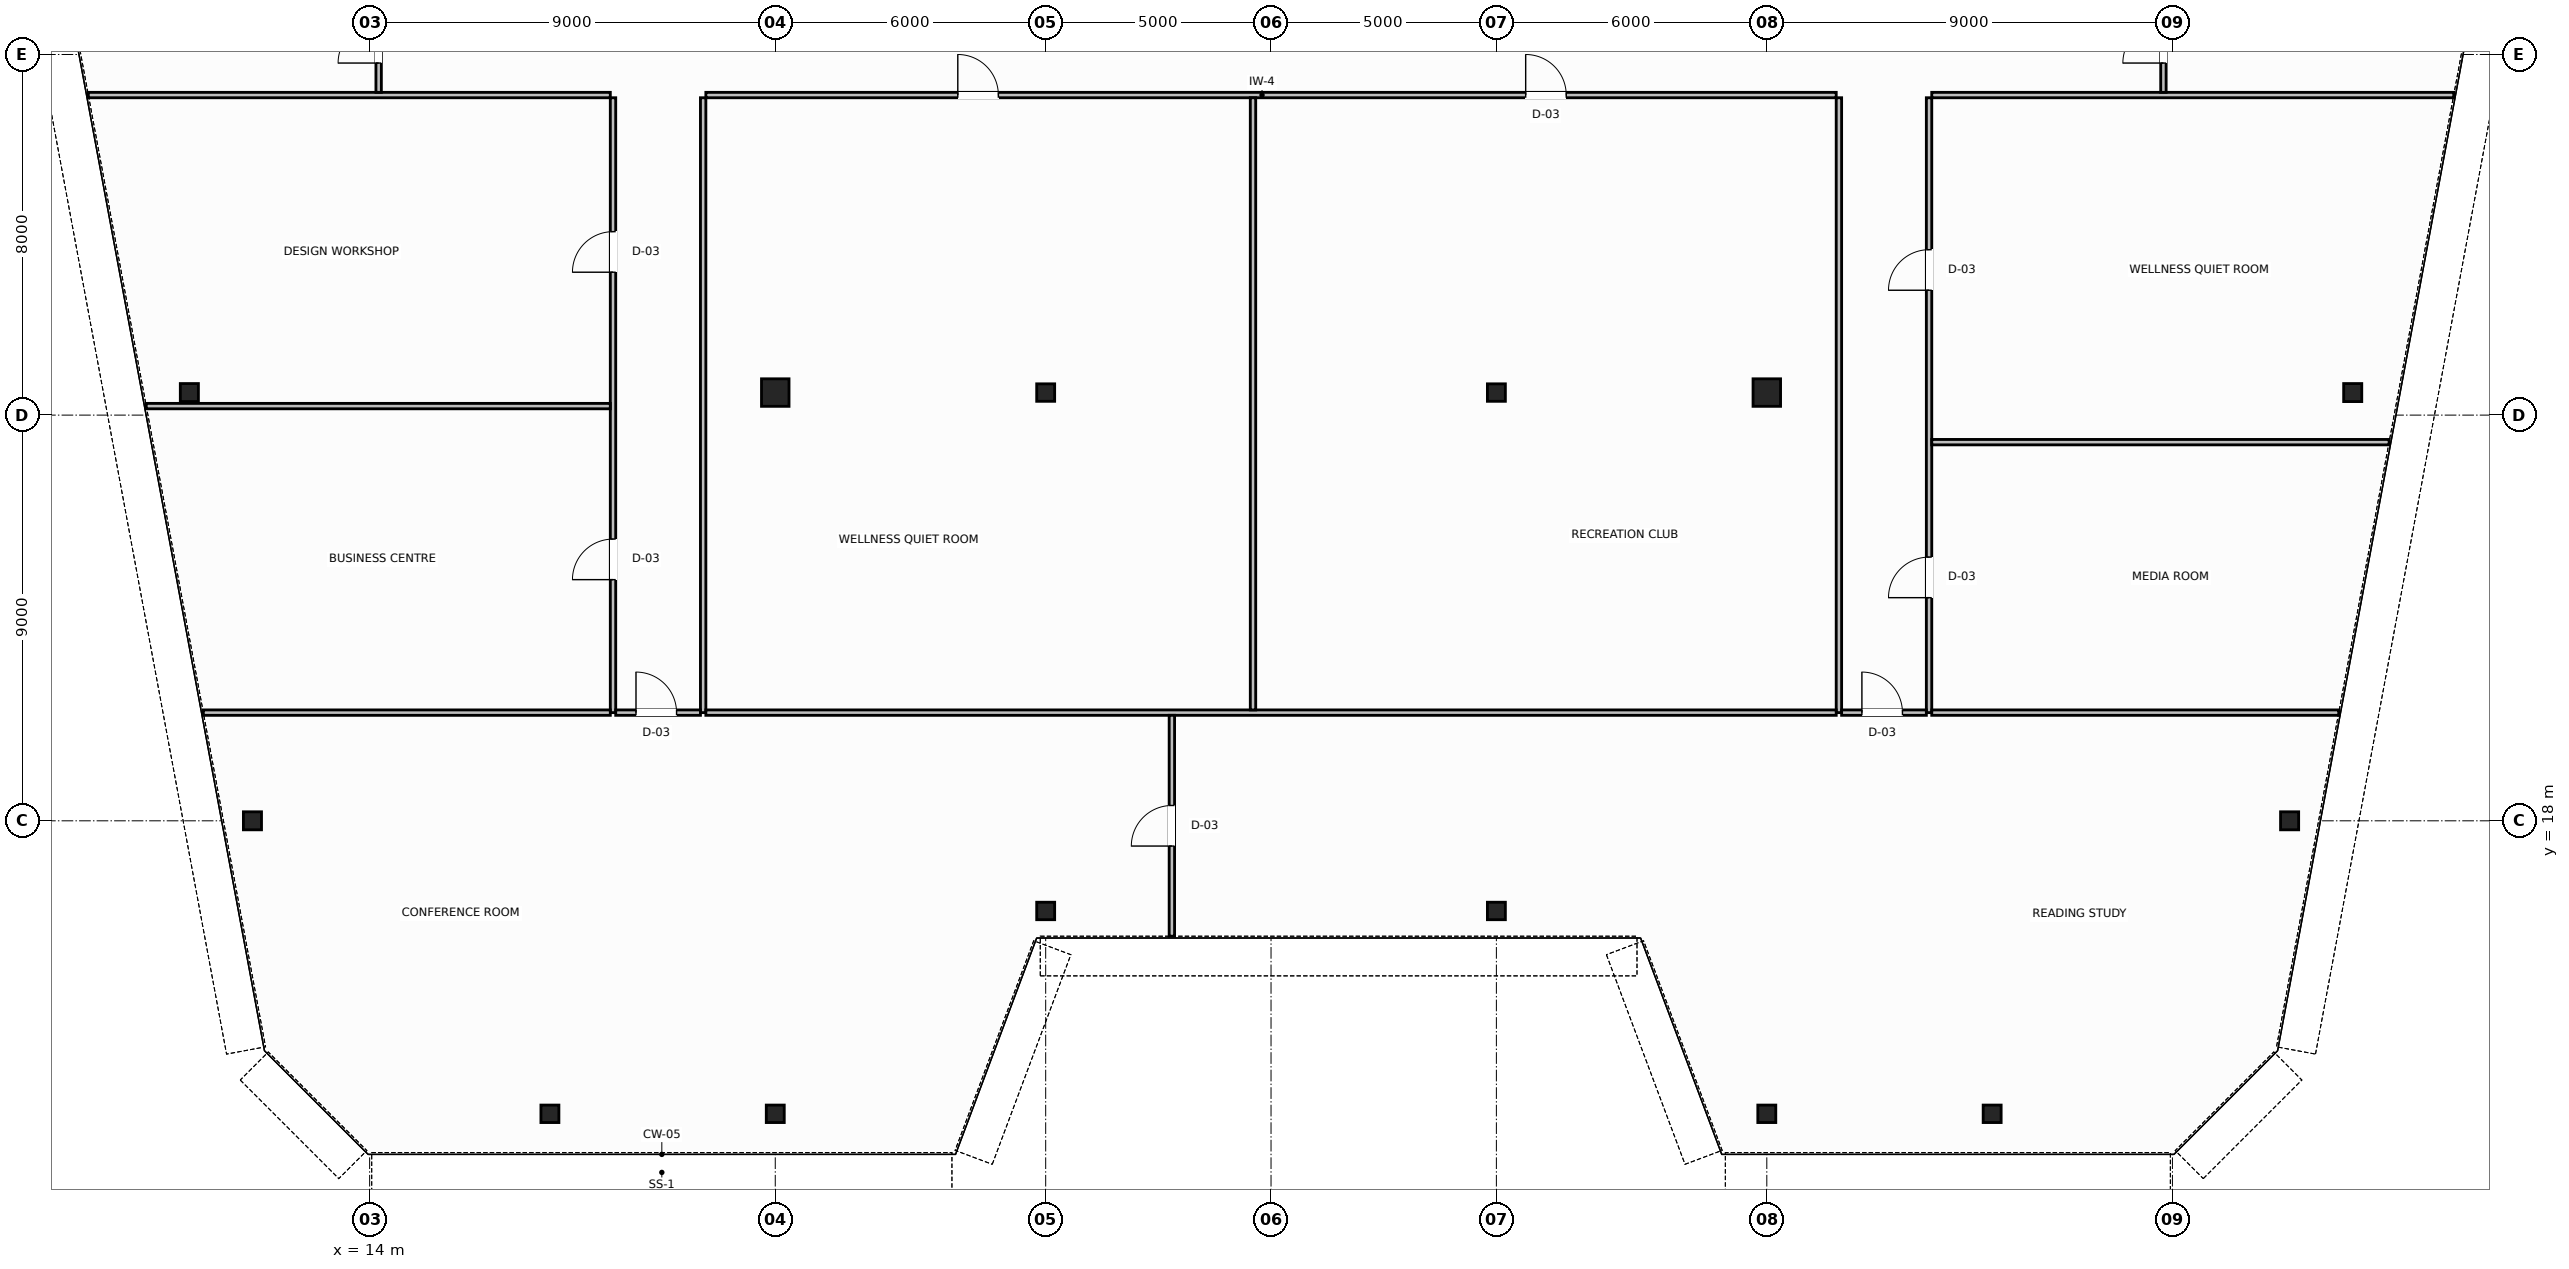
"""IFC4 building model, lengths in metres.
Left out: names, types, materials, properties, quantities, classifications, styles, units other than length and angle.
Written with IfcOpenShell. Run it as: python <this file> out.ifc"""

import sys

from ifc_helpers import new_model, si_unit, direction, frame, frame_2d, origin, origin_2d, place, context, subcontext, project, spatial, rectangle, hollow_circle, i_section, extrude, source, transform, mapped, element, fill, save


model = new_model("IFC4")
c1 = context("Model", 3, precision=1e-05, world=origin(), true_north=direction((0.0, 1.0)))
c2 = subcontext(c1, "Body", "Model", "MODEL_VIEW")
j1 = project(units=[si_unit("LENGTHUNIT", "METRE"), si_unit("PLANEANGLEUNIT", "RADIAN")], contexts=[c1])
p1 = place(None, origin())
s1 = spatial("IfcSite", under=j1, at=p1, CompositionType="ELEMENT")
p2 = place(p1, origin())
s2 = spatial("IfcBuilding", under=s1, at=p2, CompositionType="ELEMENT")
p3 = place(p2, frame((0.0, 0.0, 249.8)))
s3 = spatial("IfcBuildingStorey", under=s2, at=p3, CompositionType="ELEMENT", Elevation=249.8)
m1 = source(origin(), c2, "Body", "SweptSolid", [
    extrude(i_section(OverallWidth=0.401, OverallDepth=0.399, WebThickness=0.025, FlangeThickness=0.035, FilletRadius=0.015, at=origin_2d()), origin(), (0.0, 0.0, 1.0), 3.8),
])
for number, where, z_axis, x_axis in (
    (1, (10.0, 27.5, 0.0), (0.0, 0.0, 1.0), (1.0, 0.0, 0.0)),
    (2, (11.4, 18.0, 0.0), (0.0, 0.0, 1.0), (1.0, 0.0, 0.0)),
    (3, (58.0, 27.5, 0.0), (0.0, 0.0, 1.0), (1.0, 0.0, 0.0)),
    (4, (56.6, 18.0, 0.0), (0.0, 0.0, 1.0), (1.0, 0.0, 0.0)),
):
    element("IfcColumn", number, at=place(p3, frame(where, z_axis=z_axis, x_axis=x_axis)), inside=s3, PredefinedType="COLUMN", context=c2, shape_type="MappedRepresentation", body=[
        mapped(m1, transform((0.0, 0.0, 0.0), scale=1.0)),
    ])
m2 = source(origin(), c2, "Body", "SweptSolid", [
    extrude(hollow_circle(Radius=0.305, WallThickness=0.03, at=origin_2d()), origin(), (0.0, 0.0, 1.0), 3.8),
])
p4 = place(p3, frame((23.0, 27.5, 0.0), z_axis=(0.0, 0.0, 1.0), x_axis=(1.0, 0.0, 0.0)))
e5 = element("IfcColumn", 5, at=p4, inside=s3, PredefinedType="COLUMN", context=c2, shape_type="MappedRepresentation", body=[
    mapped(m2, transform((0.0, 0.0, 0.0), scale=1.0)),
])
m3 = source(origin(), c2, "Body", "SweptSolid", [
    extrude(i_section(OverallWidth=0.398, OverallDepth=0.387, WebThickness=0.021, FlangeThickness=0.029, FilletRadius=0.015, at=origin_2d()), origin(), (0.0, 0.0, 1.0), 3.8),
])
for number, where, z_axis, x_axis in (
    (6, (29.0, 27.5, 0.0), (0.0, 0.0, 1.0), (1.0, 0.0, 0.0)),
    (7, (39.0, 27.5, 0.0), (0.0, 0.0, 1.0), (1.0, 0.0, 0.0)),
):
    element("IfcColumn", number, at=place(p3, frame(where, z_axis=z_axis, x_axis=x_axis)), inside=s3, PredefinedType="COLUMN", context=c2, shape_type="MappedRepresentation", body=[
        mapped(m3, transform((0.0, 0.0, 0.0), scale=1.0)),
    ])
p5 = place(p3, frame((45.0, 27.5, 0.0), z_axis=(0.0, 0.0, 1.0), x_axis=(1.0, 0.0, 0.0)))
e8 = element("IfcColumn", 8, at=p5, inside=s3, PredefinedType="COLUMN", context=c2, shape_type="MappedRepresentation", body=[
    mapped(m2, transform((0.0, 0.0, 0.0), scale=1.0)),
])
for number, where, z_axis, x_axis in (
    (9, (18.0, 11.5, 0.0), (0.0, 0.0, 1.0), (1.0, 0.0, 0.0)),
    (10, (23.0, 11.5, 0.0), (0.0, 0.0, 1.0), (1.0, 0.0, 0.0)),
    (11, (29.0, 16.0, 0.0), (0.0, 0.0, 1.0), (1.0, 0.0, 0.0)),
    (12, (39.0, 16.0, 0.0), (0.0, 0.0, 1.0), (1.0, 0.0, 0.0)),
    (13, (45.0, 11.5, 0.0), (0.0, 0.0, 1.0), (1.0, 0.0, 0.0)),
    (14, (50.0, 11.5, 0.0), (0.0, 0.0, 1.0), (1.0, 0.0, 0.0)),
):
    element("IfcColumn", number, at=place(p3, frame(where, z_axis=z_axis, x_axis=x_axis)), inside=s3, PredefinedType="COLUMN", context=c2, shape_type="MappedRepresentation", body=[
        mapped(m3, transform((0.0, 0.0, 0.0), scale=1.0)),
    ])
p6 = place(p3, frame((21.46, 34.1, 0.0), z_axis=(0.0, 0.0, 1.0), x_axis=(1.0, 0.0, 0.0)))
e15 = element("IfcWall", 15, at=p6, inside=s3, PredefinedType="PARTITIONING", context=c2, shape_type="SweptSolid", body=[
    extrude(rectangle(XDim=25.08, YDim=0.12, at=frame_2d((12.54, 0.0))), origin(), (0.0, 0.0, 1.0), 3.58),
])
p7 = place(p6, frame((5.59, 0.0, 0.0)))
e16 = element("IfcOpeningElement", 16, at=p7, cuts=e15, PredefinedType="OPENING", context=c2, shape_type="SweptSolid", body=[
    extrude(rectangle(XDim=0.9, YDim=2.15, at=frame_2d((0.45, 1.075))), frame((0.0, 0.07, 0.0), z_axis=(0.0, -1.0, 0.0), x_axis=(1.0, 0.0, 0.0)), (0.0, 0.0, 1.0), 0.14),
])
p8 = place(p6, frame((18.19, 0.0, 0.0)))
e17 = element("IfcOpeningElement", 17, at=p8, cuts=e15, PredefinedType="OPENING", context=c2, shape_type="SweptSolid", body=[
    extrude(rectangle(XDim=0.9, YDim=2.15, at=frame_2d((0.45, 1.075))), frame((0.0, 0.07, 0.0), z_axis=(0.0, -1.0, 0.0), x_axis=(1.0, 0.0, 0.0)), (0.0, 0.0, 1.0), 0.14),
])
for number, where, z_axis, x_axis in (
    (18, (7.759, 34.1, 0.0), (0.0, 0.0, 1.0), (1.0, 0.0, 0.0)),
    (19, (48.66, 34.1, 0.0), (0.0, 0.0, 1.0), (1.0, 0.0, 0.0)),
):
    element("IfcWall", number, at=place(p3, frame(where, z_axis=z_axis, x_axis=x_axis)), inside=s3, PredefinedType="PARTITIONING", context=c2, shape_type="SweptSolid", body=[
        extrude(rectangle(XDim=11.582, YDim=0.12, at=frame_2d((5.791, 0.0))), origin(), (0.0, 0.0, 1.0), 3.58),
    ])
p9 = place(p3, frame((14.2, 34.16, 0.0), z_axis=(0.0, 0.0, 1.0), x_axis=(0.0, 1.0, 0.0)))
e20 = element("IfcWall", 20, at=p9, inside=s3, PredefinedType="PARTITIONING", context=c2, shape_type="SweptSolid", body=[
    extrude(rectangle(XDim=2.28, YDim=0.12, at=frame_2d((1.14, 0.0))), origin(), (0.0, 0.0, 1.0), 3.58),
])
p10 = place(p9, frame((0.65, 0.0, 0.0)))
e21 = element("IfcOpeningElement", 21, at=p10, cuts=e20, PredefinedType="OPENING", context=c2, shape_type="SweptSolid", body=[
    extrude(rectangle(XDim=0.9, YDim=2.15, at=frame_2d((0.45, 1.075))), frame((0.0, 0.07, 0.0), z_axis=(0.0, -1.0, 0.0), x_axis=(1.0, 0.0, 0.0)), (0.0, 0.0, 1.0), 0.14),
])
p11 = place(p3, frame((53.8, 34.16, 0.0), z_axis=(0.0, 0.0, 1.0), x_axis=(0.0, 1.0, 0.0)))
e22 = element("IfcWall", 22, at=p11, inside=s3, PredefinedType="PARTITIONING", context=c2, shape_type="SweptSolid", body=[
    extrude(rectangle(XDim=2.28, YDim=0.12, at=frame_2d((1.14, 0.0))), origin(), (0.0, 0.0, 1.0), 3.58),
])
p12 = place(p11, frame((0.65, 0.0, 0.0)))
e23 = element("IfcOpeningElement", 23, at=p12, cuts=e22, PredefinedType="OPENING", context=c2, shape_type="SweptSolid", body=[
    extrude(rectangle(XDim=0.9, YDim=2.15, at=frame_2d((0.45, 1.075))), frame((0.0, 0.07, 0.0), z_axis=(0.0, -1.0, 0.0), x_axis=(1.0, 0.0, 0.0)), (0.0, 0.0, 1.0), 0.14),
])
p13 = place(p3, frame((19.4, 20.4, 0.0), z_axis=(0.0, 0.0, 1.0), x_axis=(0.0, 1.0, 0.0)))
e24 = element("IfcWall", 24, at=p13, inside=s3, PredefinedType="PARTITIONING", context=c2, shape_type="SweptSolid", body=[
    extrude(rectangle(XDim=13.64, YDim=0.12, at=frame_2d((6.82, 0.0))), origin(), (0.0, 0.0, 1.0), 3.58),
])
p14 = place(p13, frame((2.95, 0.0, 0.0)))
e25 = element("IfcOpeningElement", 25, at=p14, cuts=e24, PredefinedType="OPENING", context=c2, shape_type="SweptSolid", body=[
    extrude(rectangle(XDim=0.9, YDim=2.15, at=frame_2d((0.45, 1.075))), frame((0.0, 0.07, 0.0), z_axis=(0.0, -1.0, 0.0), x_axis=(1.0, 0.0, 0.0)), (0.0, 0.0, 1.0), 0.14),
])
p15 = place(p13, frame((9.77, 0.0, 0.0)))
e26 = element("IfcOpeningElement", 26, at=p15, cuts=e24, PredefinedType="OPENING", context=c2, shape_type="SweptSolid", body=[
    extrude(rectangle(XDim=0.9, YDim=2.15, at=frame_2d((0.45, 1.075))), frame((0.0, 0.07, 0.0), z_axis=(0.0, -1.0, 0.0), x_axis=(1.0, 0.0, 0.0)), (0.0, 0.0, 1.0), 0.14),
])
for number, where, z_axis, x_axis in (
    (27, (21.4, 20.4, 0.0), (0.0, 0.0, 1.0), (0.0, 1.0, 0.0)),
    (28, (46.6, 20.4, 0.0), (0.0, 0.0, 1.0), (0.0, 1.0, 0.0)),
):
    element("IfcWall", number, at=place(p3, frame(where, z_axis=z_axis, x_axis=x_axis)), inside=s3, PredefinedType="PARTITIONING", context=c2, shape_type="SweptSolid", body=[
        extrude(rectangle(XDim=13.64, YDim=0.12, at=frame_2d((6.82, 0.0))), origin(), (0.0, 0.0, 1.0), 3.58),
    ])
p16 = place(p3, frame((48.6, 20.4, 0.0), z_axis=(0.0, 0.0, 1.0), x_axis=(0.0, 1.0, 0.0)))
e29 = element("IfcWall", 29, at=p16, inside=s3, PredefinedType="PARTITIONING", context=c2, shape_type="SweptSolid", body=[
    extrude(rectangle(XDim=13.64, YDim=0.12, at=frame_2d((6.82, 0.0))), origin(), (0.0, 0.0, 1.0), 3.58),
])
p17 = place(p16, frame((2.55, 0.0, 0.0)))
e30 = element("IfcOpeningElement", 30, at=p17, cuts=e29, PredefinedType="OPENING", context=c2, shape_type="SweptSolid", body=[
    extrude(rectangle(XDim=0.9, YDim=2.15, at=frame_2d((0.45, 1.075))), frame((0.0, 0.07, 0.0), z_axis=(0.0, -1.0, 0.0), x_axis=(1.0, 0.0, 0.0)), (0.0, 0.0, 1.0), 0.14),
])
p18 = place(p16, frame((9.37, 0.0, 0.0)))
e31 = element("IfcOpeningElement", 31, at=p18, cuts=e29, PredefinedType="OPENING", context=c2, shape_type="SweptSolid", body=[
    extrude(rectangle(XDim=0.9, YDim=2.15, at=frame_2d((0.45, 1.075))), frame((0.0, 0.07, 0.0), z_axis=(0.0, -1.0, 0.0), x_axis=(1.0, 0.0, 0.0)), (0.0, 0.0, 1.0), 0.14),
])
p19 = place(p3, frame((19.46, 20.4, 0.0), z_axis=(0.0, 0.0, 1.0), x_axis=(1.0, 0.0, 0.0)))
e32 = element("IfcWall", 32, at=p19, inside=s3, PredefinedType="PARTITIONING", context=c2, shape_type="SweptSolid", body=[
    extrude(rectangle(XDim=1.88, YDim=0.12, at=frame_2d((0.94, 0.0))), origin(), (0.0, 0.0, 1.0), 3.58),
])
p20 = place(p19, frame((0.45, 0.0, 0.0)))
e33 = element("IfcOpeningElement", 33, at=p20, cuts=e32, PredefinedType="OPENING", context=c2, shape_type="SweptSolid", body=[
    extrude(rectangle(XDim=0.9, YDim=2.15, at=frame_2d((0.45, 1.075))), frame((0.0, 0.07, 0.0), z_axis=(0.0, -1.0, 0.0), x_axis=(1.0, 0.0, 0.0)), (0.0, 0.0, 1.0), 0.14),
])
p21 = place(p3, frame((46.66, 20.4, 0.0), z_axis=(0.0, 0.0, 1.0), x_axis=(1.0, 0.0, 0.0)))
e34 = element("IfcWall", 34, at=p21, inside=s3, PredefinedType="PARTITIONING", context=c2, shape_type="SweptSolid", body=[
    extrude(rectangle(XDim=1.88, YDim=0.12, at=frame_2d((0.94, 0.0))), origin(), (0.0, 0.0, 1.0), 3.58),
])
p22 = place(p21, frame((0.45, 0.0, 0.0)))
e35 = element("IfcOpeningElement", 35, at=p22, cuts=e34, PredefinedType="OPENING", context=c2, shape_type="SweptSolid", body=[
    extrude(rectangle(XDim=0.9, YDim=2.15, at=frame_2d((0.45, 1.075))), frame((0.0, 0.07, 0.0), z_axis=(0.0, -1.0, 0.0), x_axis=(1.0, 0.0, 0.0)), (0.0, 0.0, 1.0), 0.14),
])
p23 = place(p3, frame((10.31, 20.4, 0.0), z_axis=(0.0, 0.0, 1.0), x_axis=(1.0, 0.0, 0.0)))
e36 = element("IfcWall", 36, at=p23, inside=s3, PredefinedType="PARTITIONING", context=c2, shape_type="SweptSolid", body=[
    extrude(rectangle(XDim=9.031, YDim=0.12, at=frame_2d((4.515, 0.0))), origin(), (0.0, 0.0, 1.0), 3.58),
])
p24 = place(p3, frame((9.043, 27.2, 0.0), z_axis=(0.0, 0.0, 1.0), x_axis=(1.0, 0.0, 0.0)))
e37 = element("IfcWall", 37, at=p24, inside=s3, PredefinedType="PARTITIONING", context=c2, shape_type="SweptSolid", body=[
    extrude(rectangle(XDim=10.297, YDim=0.12, at=frame_2d((5.148, 0.0))), origin(), (0.0, 0.0, 1.0), 3.58),
])
p25 = place(p3, frame((48.66, 20.4, 0.0), z_axis=(0.0, 0.0, 1.0), x_axis=(1.0, 0.0, 0.0)))
e38 = element("IfcWall", 38, at=p25, inside=s3, PredefinedType="PARTITIONING", context=c2, shape_type="SweptSolid", body=[
    extrude(rectangle(XDim=9.031, YDim=0.12, at=frame_2d((4.515, 0.0))), origin(), (0.0, 0.0, 1.0), 3.58),
])
p26 = place(p3, frame((48.66, 26.4, 0.0), z_axis=(0.0, 0.0, 1.0), x_axis=(1.0, 0.0, 0.0)))
e39 = element("IfcWall", 39, at=p26, inside=s3, PredefinedType="PARTITIONING", context=c2, shape_type="SweptSolid", body=[
    extrude(rectangle(XDim=10.148, YDim=0.12, at=frame_2d((5.074, 0.0))), origin(), (0.0, 0.0, 1.0), 3.58),
])
p27 = place(p3, frame((21.46, 20.4, 0.0), z_axis=(0.0, 0.0, 1.0), x_axis=(1.0, 0.0, 0.0)))
e40 = element("IfcWall", 40, at=p27, inside=s3, PredefinedType="PARTITIONING", context=c2, shape_type="SweptSolid", body=[
    extrude(rectangle(XDim=25.08, YDim=0.12, at=frame_2d((12.54, 0.0))), origin(), (0.0, 0.0, 1.0), 3.58),
])
p28 = place(p3, frame((33.6, 20.46, 0.0), z_axis=(0.0, 0.0, 1.0), x_axis=(0.0, 1.0, 0.0)))
e41 = element("IfcWall", 41, at=p28, inside=s3, PredefinedType="PARTITIONING", context=c2, shape_type="SweptSolid", body=[
    extrude(rectangle(XDim=13.58, YDim=0.12, at=frame_2d((6.79, 0.0))), origin(), (0.0, 0.0, 1.0), 3.58),
])
p29 = place(p3, frame((31.8, 15.44, 0.0), z_axis=(0.0, 0.0, 1.0), x_axis=(0.0, 1.0, 0.0)))
e42 = element("IfcWall", 42, at=p29, inside=s3, PredefinedType="PARTITIONING", context=c2, shape_type="SweptSolid", body=[
    extrude(rectangle(XDim=4.9, YDim=0.12, at=frame_2d((2.45, 0.0))), origin(), (0.0, 0.0, 1.0), 3.58),
])
p30 = place(p29, frame((2.0, 0.0, 0.0)))
e43 = element("IfcOpeningElement", 43, at=p30, cuts=e42, PredefinedType="OPENING", context=c2, shape_type="SweptSolid", body=[
    extrude(rectangle(XDim=0.9, YDim=2.15, at=frame_2d((0.45, 1.075))), frame((0.0, 0.07, 0.0), z_axis=(0.0, -1.0, 0.0), x_axis=(1.0, 0.0, 0.0)), (0.0, 0.0, 1.0), 0.14),
])
m4 = source(origin(), c2, "Body", "SweptSolid", [
    extrude(rectangle(XDim=0.9, YDim=2.15, at=frame_2d((0.45, 1.075))), frame((0.0, 0.025, 0.0), z_axis=(0.0, -1.0, 0.0), x_axis=(1.0, 0.0, 0.0)), (0.0, 0.0, 1.0), 0.05),
])
p31 = place(p10, origin())
e44 = element("IfcDoor", 44, at=p31, inside=s3, OperationType="SINGLE_SWING_LEFT", PredefinedType="DOOR", context=c2, shape_type="MappedRepresentation", body=[
    mapped(m4, transform((0.0, 0.0, 0.0), scale=1.0)),
])
fill(e21, e44)
p32 = place(p12, origin())
e45 = element("IfcDoor", 45, at=p32, inside=s3, OperationType="SINGLE_SWING_RIGHT", PredefinedType="DOOR", context=c2, shape_type="MappedRepresentation", body=[
    mapped(m4, transform((0.0, 0.0, 0.0), scale=1.0)),
])
fill(e23, e45)
p33 = place(p14, origin())
e46 = element("IfcDoor", 46, at=p33, inside=s3, OperationType="SINGLE_SWING_LEFT", PredefinedType="DOOR", context=c2, shape_type="MappedRepresentation", body=[
    mapped(m4, transform((0.0, 0.0, 0.0), scale=1.0)),
])
fill(e25, e46)
p34 = place(p15, origin())
e47 = element("IfcDoor", 47, at=p34, inside=s3, OperationType="SINGLE_SWING_RIGHT", PredefinedType="DOOR", context=c2, shape_type="MappedRepresentation", body=[
    mapped(m4, transform((0.0, 0.0, 0.0), scale=1.0)),
])
fill(e26, e47)
p35 = place(p17, origin())
e48 = element("IfcDoor", 48, at=p35, inside=s3, OperationType="SINGLE_SWING_RIGHT", PredefinedType="DOOR", context=c2, shape_type="MappedRepresentation", body=[
    mapped(m4, transform((0.0, 0.0, 0.0), scale=1.0)),
])
fill(e30, e48)
p36 = place(p18, origin())
e49 = element("IfcDoor", 49, at=p36, inside=s3, OperationType="SINGLE_SWING_LEFT", PredefinedType="DOOR", context=c2, shape_type="MappedRepresentation", body=[
    mapped(m4, transform((0.0, 0.0, 0.0), scale=1.0)),
])
fill(e31, e49)
p37 = place(p7, origin())
e50 = element("IfcDoor", 50, at=p37, inside=s3, OperationType="SINGLE_SWING_LEFT", PredefinedType="DOOR", context=c2, shape_type="MappedRepresentation", body=[
    mapped(m4, transform((0.0, 0.0, 0.0), scale=1.0)),
])
fill(e16, e50)
p38 = place(p8, origin())
e51 = element("IfcDoor", 51, at=p38, inside=s3, OperationType="SINGLE_SWING_RIGHT", PredefinedType="DOOR", context=c2, shape_type="MappedRepresentation", body=[
    mapped(m4, transform((0.0, 0.0, 0.0), scale=1.0)),
])
fill(e17, e51)
p39 = place(p20, origin())
e52 = element("IfcDoor", 52, at=p39, inside=s3, OperationType="SINGLE_SWING_LEFT", PredefinedType="DOOR", context=c2, shape_type="MappedRepresentation", body=[
    mapped(m4, transform((0.0, 0.0, 0.0), scale=1.0)),
])
fill(e33, e52)
p40 = place(p30, origin())
e53 = element("IfcDoor", 53, at=p40, inside=s3, OperationType="SINGLE_SWING_RIGHT", PredefinedType="DOOR", context=c2, shape_type="MappedRepresentation", body=[
    mapped(m4, transform((0.0, 0.0, 0.0), scale=1.0)),
])
fill(e43, e53)
p41 = place(p22, origin())
e54 = element("IfcDoor", 54, at=p41, inside=s3, OperationType="SINGLE_SWING_RIGHT", PredefinedType="DOOR", context=c2, shape_type="MappedRepresentation", body=[
    mapped(m4, transform((0.0, 0.0, 0.0), scale=1.0)),
])
fill(e35, e54)
save(model, sys.argv[1])
